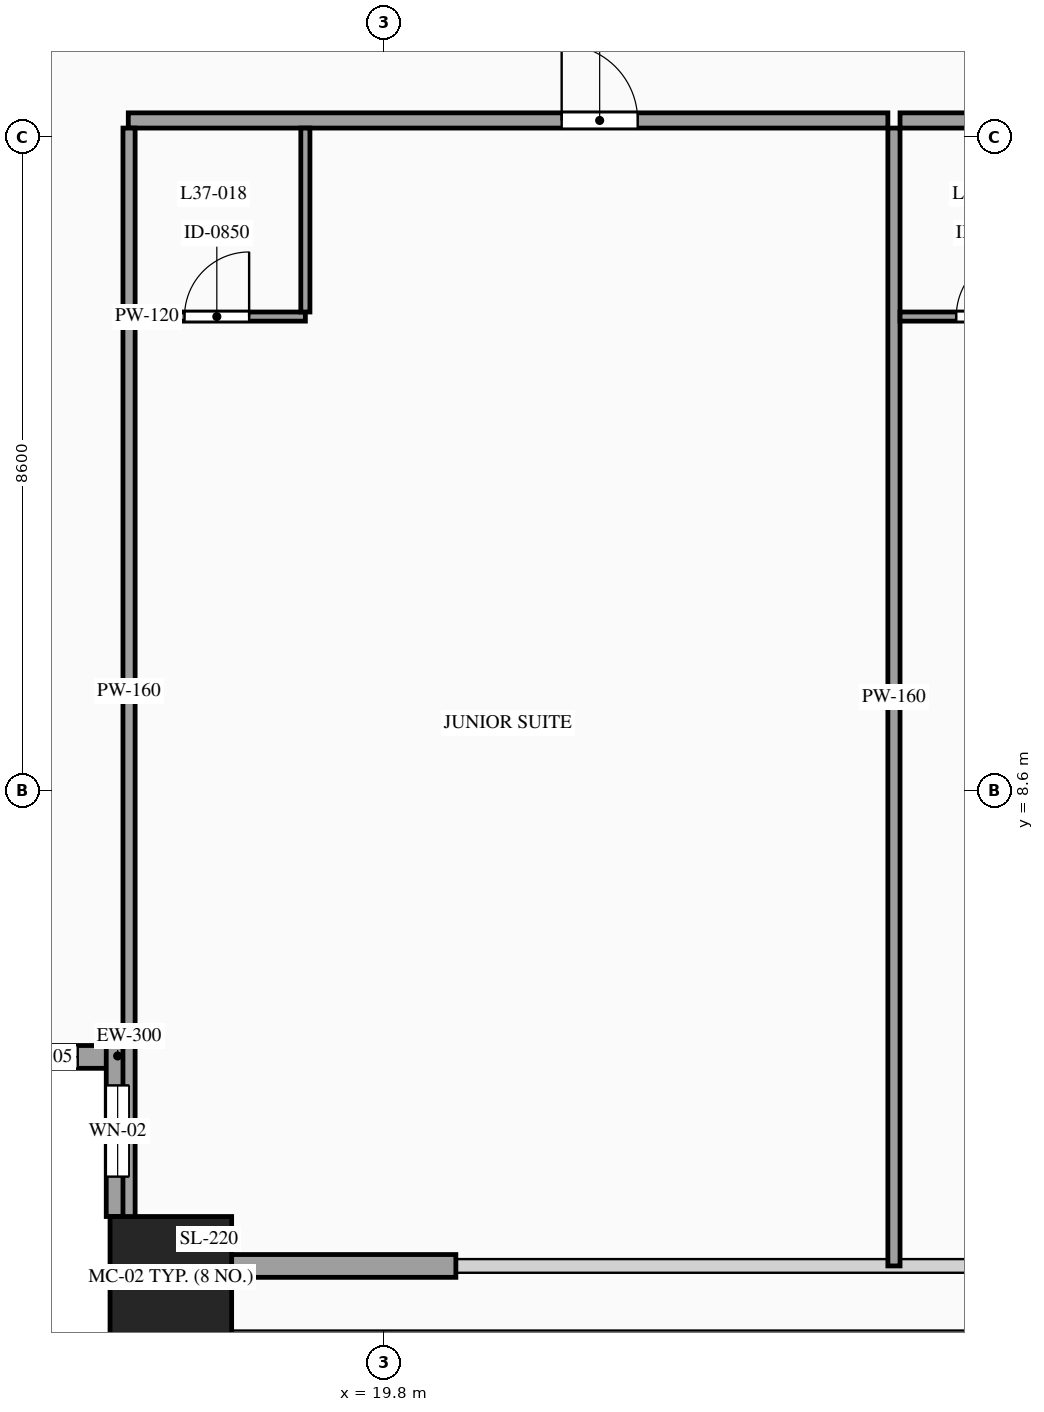
"""IFC4 building model, lengths in metres.
Left out: names, types, materials, properties, quantities, classifications, styles, units other than length and angle.
Written with IfcOpenShell. Run it as: python <this file> out.ifc"""

import sys

from ifc_helpers import new_model, si_unit, direction, frame, frame_2d, origin, origin_2d, place, context, subcontext, project, spatial, rectangle, hollow_rectangle, extrude, source, transform, mapped, element, fill, save


model = new_model("IFC4")
c1 = context("Model", 3, precision=1e-05, world=origin(), true_north=direction((0.0, 1.0)))
c2 = subcontext(c1, "Body", "Model", "MODEL_VIEW")
j1 = project(units=[si_unit("LENGTHUNIT", "METRE"), si_unit("PLANEANGLEUNIT", "RADIAN")], contexts=[c1])
p1 = place(None, origin())
s1 = spatial("IfcSite", under=j1, at=p1, CompositionType="ELEMENT")
p2 = place(p1, origin())
s2 = spatial("IfcBuilding", under=s1, at=p2, CompositionType="ELEMENT")
p3 = place(p2, frame((0.0, 0.0, 141.6)))
s3 = spatial("IfcBuildingStorey", under=s2, at=p3, CompositionType="ELEMENT", Elevation=141.6)
m1 = source(origin(), c2, "Body", "SweptSolid", [
    extrude(hollow_rectangle(XDim=1.6, YDim=1.6, WallThickness=0.07, at=origin_2d()), origin(), (0.0, 0.0, 1.0), 3.6),
])
p4 = place(p3, frame((17.0, 2.2, 0.0), z_axis=(0.0, 0.0, 1.0), x_axis=(1.0, 0.0, 0.0)))
e1 = element("IfcColumn", 1, at=p4, inside=s3, PredefinedType="COLUMN", context=c2, shape_type="MappedRepresentation", body=[
    mapped(m1, transform((0.0, 0.0, 0.0), scale=1.0)),
])
p5 = place(p3, frame((14.2, 5.1, 0.0), z_axis=(0.0, 0.0, 1.0), x_axis=(1.0, 0.0, 0.0)))
e2 = element("IfcWall", 2, at=p5, inside=s3, PredefinedType="SOLIDWALL", context=c2, shape_type="SweptSolid", body=[
    extrude(rectangle(XDim=2.25, YDim=0.3, at=frame_2d((1.125, 0.0))), origin(), (0.0, 0.0, 1.0), 3.38),
])
p6 = place(p5, frame((0.675, 0.0, 0.85)))
e3 = element("IfcOpeningElement", 3, at=p6, cuts=e2, PredefinedType="OPENING", context=c2, shape_type="SweptSolid", body=[
    extrude(rectangle(XDim=0.9, YDim=1.5, at=frame_2d((0.45, 0.75))), frame((0.0, 0.165, 0.0), z_axis=(0.0, -1.0, 0.0), x_axis=(1.0, 0.0, 0.0)), (0.0, 0.0, 1.0), 0.33),
])
p7 = place(p3, frame((16.3, 5.25, 0.0), z_axis=(0.0, 0.0, 1.0), x_axis=(0.0, -1.0, 0.0)))
e4 = element("IfcWall", 4, at=p7, inside=s3, PredefinedType="SOLIDWALL", context=c2, shape_type="SweptSolid", body=[
    extrude(rectangle(XDim=2.25, YDim=0.3, at=frame_2d((1.125, 0.0))), origin(), (0.0, 0.0, 1.0), 3.38),
])
p8 = place(p7, frame((0.525, 0.0, 0.85)))
e5 = element("IfcOpeningElement", 5, at=p8, cuts=e4, PredefinedType="OPENING", context=c2, shape_type="SweptSolid", body=[
    extrude(rectangle(XDim=1.2, YDim=2.1, at=frame_2d((0.6, 1.05))), frame((0.0, 0.165, 0.0), z_axis=(0.0, -1.0, 0.0), x_axis=(1.0, 0.0, 0.0)), (0.0, 0.0, 1.0), 0.33),
])
m2 = source(origin(), c2, "Body", "SweptSolid", [
    extrude(rectangle(XDim=2.95, YDim=0.3, at=frame_2d((1.475, 0.0))), origin(), (0.0, 0.0, 1.0), 2.775),
])
p9 = place(p3, frame((17.8, 2.35, 0.0), z_axis=(0.0, 0.0, 1.0), x_axis=(1.0, 0.0, 0.0)))
e6 = element("IfcWall", 6, at=p9, inside=s3, PredefinedType="SOLIDWALL", context=c2, shape_type="MappedRepresentation", body=[
    mapped(m2, transform((0.0, 0.0, 0.0), scale=1.0)),
])
p10 = place(p3, frame((16.44, 17.42, 0.0), z_axis=(0.0, 0.0, 1.0), x_axis=(1.0, 0.0, 0.0)))
e7 = element("IfcWall", 7, at=p10, inside=s3, PredefinedType="PARTITIONING", context=c2, shape_type="SweptSolid", body=[
    extrude(rectangle(XDim=9.994, YDim=0.2, at=frame_2d((4.997, 0.0))), origin(), (0.0, 0.0, 1.0), 3.38),
])
p11 = place(p10, frame((5.702, 0.0, 0.0)))
e8 = element("IfcOpeningElement", 8, at=p11, cuts=e7, PredefinedType="OPENING", context=c2, shape_type="SweptSolid", body=[
    extrude(rectangle(XDim=1.0, YDim=2.2, at=frame_2d((0.5, 1.1))), frame((0.0, 0.115, 0.0), z_axis=(0.0, -1.0, 0.0), x_axis=(1.0, 0.0, 0.0)), (0.0, 0.0, 1.0), 0.23),
])
m3 = source(origin(), c2, "Body", "SweptSolid", [
    extrude(rectangle(XDim=14.97, YDim=0.16, at=frame_2d((7.485, 0.0))), origin(), (0.0, 0.0, 1.0), 3.38),
])
p12 = place(p3, frame((26.514, 2.35, 0.0), z_axis=(0.0, 0.0, 1.0), x_axis=(0.0, 1.0, 0.0)))
e9 = element("IfcWall", 9, at=p12, inside=s3, PredefinedType="PARTITIONING", context=c2, shape_type="MappedRepresentation", body=[
    mapped(m3, transform((0.0, 0.0, 0.0), scale=1.0)),
])
p13 = place(p3, frame((16.44, 14.84, 0.0), z_axis=(0.0, 0.0, 1.0), x_axis=(1.0, 0.0, 0.0)))
e10 = element("IfcWall", 10, at=p13, inside=s3, PredefinedType="PARTITIONING", context=c2, shape_type="SweptSolid", body=[
    extrude(rectangle(XDim=2.33, YDim=0.12, at=frame_2d((1.165, 0.0))), origin(), (0.0, 0.0, 1.0), 3.38),
])
p14 = place(p13, frame((0.74, 0.0, 0.0)))
e11 = element("IfcOpeningElement", 11, at=p14, cuts=e10, PredefinedType="OPENING", context=c2, shape_type="SweptSolid", body=[
    extrude(rectangle(XDim=0.85, YDim=2.1, at=frame_2d((0.425, 1.05))), frame((0.0, 0.075, 0.0), z_axis=(0.0, -1.0, 0.0), x_axis=(1.0, 0.0, 0.0)), (0.0, 0.0, 1.0), 0.15),
])
m4 = source(origin(), c2, "Body", "SweptSolid", [
    extrude(rectangle(XDim=2.42, YDim=0.12, at=frame_2d((1.21, 0.0))), origin(), (0.0, 0.0, 1.0), 3.38),
])
p15 = place(p3, frame((18.77, 14.9, 0.0), z_axis=(0.0, 0.0, 1.0), x_axis=(0.0, 1.0, 0.0)))
e12 = element("IfcWall", 12, at=p15, inside=s3, PredefinedType="PARTITIONING", context=c2, shape_type="MappedRepresentation", body=[
    mapped(m4, transform((0.0, 0.0, 0.0), scale=1.0)),
])
p16 = place(p3, frame((26.594, 17.42, 0.0), z_axis=(0.0, 0.0, 1.0), x_axis=(1.0, 0.0, 0.0)))
e13 = element("IfcWall", 13, at=p16, inside=s3, PredefinedType="PARTITIONING", context=c2, shape_type="SweptSolid", body=[
    extrude(rectangle(XDim=5.104, YDim=0.2, at=frame_2d((2.552, 0.0))), origin(), (0.0, 0.0, 1.0), 3.38),
])
p17 = place(p16, frame((3.257, 0.0, 0.0)))
e14 = element("IfcOpeningElement", 14, at=p17, cuts=e13, PredefinedType="OPENING", context=c2, shape_type="SweptSolid", body=[
    extrude(rectangle(XDim=1.0, YDim=2.2, at=frame_2d((0.5, 1.1))), frame((0.0, 0.115, 0.0), z_axis=(0.0, -1.0, 0.0), x_axis=(1.0, 0.0, 0.0)), (0.0, 0.0, 1.0), 0.23),
])
p18 = place(p3, frame((26.594, 14.84, 0.0), z_axis=(0.0, 0.0, 1.0), x_axis=(1.0, 0.0, 0.0)))
e15 = element("IfcWall", 15, at=p18, inside=s3, PredefinedType="PARTITIONING", context=c2, shape_type="SweptSolid", body=[
    extrude(rectangle(XDim=2.33, YDim=0.12, at=frame_2d((1.165, 0.0))), origin(), (0.0, 0.0, 1.0), 3.38),
])
p19 = place(p18, frame((0.74, 0.0, 0.0)))
e16 = element("IfcOpeningElement", 16, at=p19, cuts=e15, PredefinedType="OPENING", context=c2, shape_type="SweptSolid", body=[
    extrude(rectangle(XDim=0.85, YDim=2.1, at=frame_2d((0.425, 1.05))), frame((0.0, 0.075, 0.0), z_axis=(0.0, -1.0, 0.0), x_axis=(1.0, 0.0, 0.0)), (0.0, 0.0, 1.0), 0.15),
])
m5 = source(origin(), c2, "Body", "SweptSolid", [
    extrude(rectangle(XDim=14.82, YDim=0.16, at=frame_2d((7.41, 0.0))), origin(), (0.0, 0.0, 1.0), 3.38),
])
p20 = place(p3, frame((16.45, 2.5, 0.0), z_axis=(0.0, 0.0, 1.0), x_axis=(0.0, 1.0, 0.0)))
e17 = element("IfcWall", 17, at=p20, inside=s3, PredefinedType="PARTITIONING", context=c2, shape_type="MappedRepresentation", body=[
    mapped(m5, transform((0.0, 0.0, 0.0), scale=1.0)),
])
m6 = source(origin(), c2, "Body", "SweptSolid", [
    extrude(rectangle(XDim=0.9, YDim=1.5, at=frame_2d((0.45, 0.75))), frame((0.0, 0.03, 0.0), z_axis=(0.0, -1.0, 0.0), x_axis=(1.0, 0.0, 0.0)), (0.0, 0.0, 1.0), 0.06),
])
p21 = place(p6, origin())
e18 = element("IfcWindow", 18, at=p21, inside=s3, PartitioningType="SINGLE_PANEL", PredefinedType="WINDOW", context=c2, shape_type="MappedRepresentation", body=[
    mapped(m6, transform((0.0, 0.0, 0.0), scale=1.0)),
])
fill(e3, e18)
m7 = source(origin(), c2, "Body", "SweptSolid", [
    extrude(rectangle(XDim=1.2, YDim=2.1, at=frame_2d((0.6, 1.05))), frame((0.0, 0.03, 0.0), z_axis=(0.0, -1.0, 0.0), x_axis=(1.0, 0.0, 0.0)), (0.0, 0.0, 1.0), 0.06),
])
p22 = place(p8, origin())
e19 = element("IfcWindow", 19, at=p22, inside=s3, PartitioningType="SINGLE_PANEL", PredefinedType="WINDOW", context=c2, shape_type="MappedRepresentation", body=[
    mapped(m7, transform((0.0, 0.0, 0.0), scale=1.0)),
])
fill(e5, e19)
m8 = source(origin(), c2, "Body", "SweptSolid", [
    extrude(rectangle(XDim=1.0, YDim=2.2, at=frame_2d((0.5, 1.1))), frame((0.0, 0.025, 0.0), z_axis=(0.0, -1.0, 0.0), x_axis=(1.0, 0.0, 0.0)), (0.0, 0.0, 1.0), 0.05),
])
p23 = place(p11, origin())
e20 = element("IfcDoor", 20, at=p23, inside=s3, OperationType="SINGLE_SWING_LEFT", PredefinedType="DOOR", context=c2, shape_type="MappedRepresentation", body=[
    mapped(m8, transform((0.0, 0.0, 0.0), scale=1.0)),
])
fill(e8, e20)
m9 = source(origin(), c2, "Body", "SweptSolid", [
    extrude(rectangle(XDim=0.85, YDim=2.1, at=frame_2d((0.425, 1.05))), frame((0.0, 0.025, 0.0), z_axis=(0.0, -1.0, 0.0), x_axis=(1.0, 0.0, 0.0)), (0.0, 0.0, 1.0), 0.05),
])
p24 = place(p14, origin())
e21 = element("IfcDoor", 21, at=p24, inside=s3, OperationType="SINGLE_SWING_RIGHT", PredefinedType="DOOR", context=c2, shape_type="MappedRepresentation", body=[
    mapped(m9, transform((0.0, 0.0, 0.0), scale=1.0)),
])
fill(e11, e21)
p25 = place(p19, origin())
e22 = element("IfcDoor", 22, at=p25, inside=s3, OperationType="SINGLE_SWING_RIGHT", PredefinedType="DOOR", context=c2, shape_type="MappedRepresentation", body=[
    mapped(m9, transform((0.0, 0.0, 0.0), scale=1.0)),
])
fill(e16, e22)
save(model, sys.argv[1])
